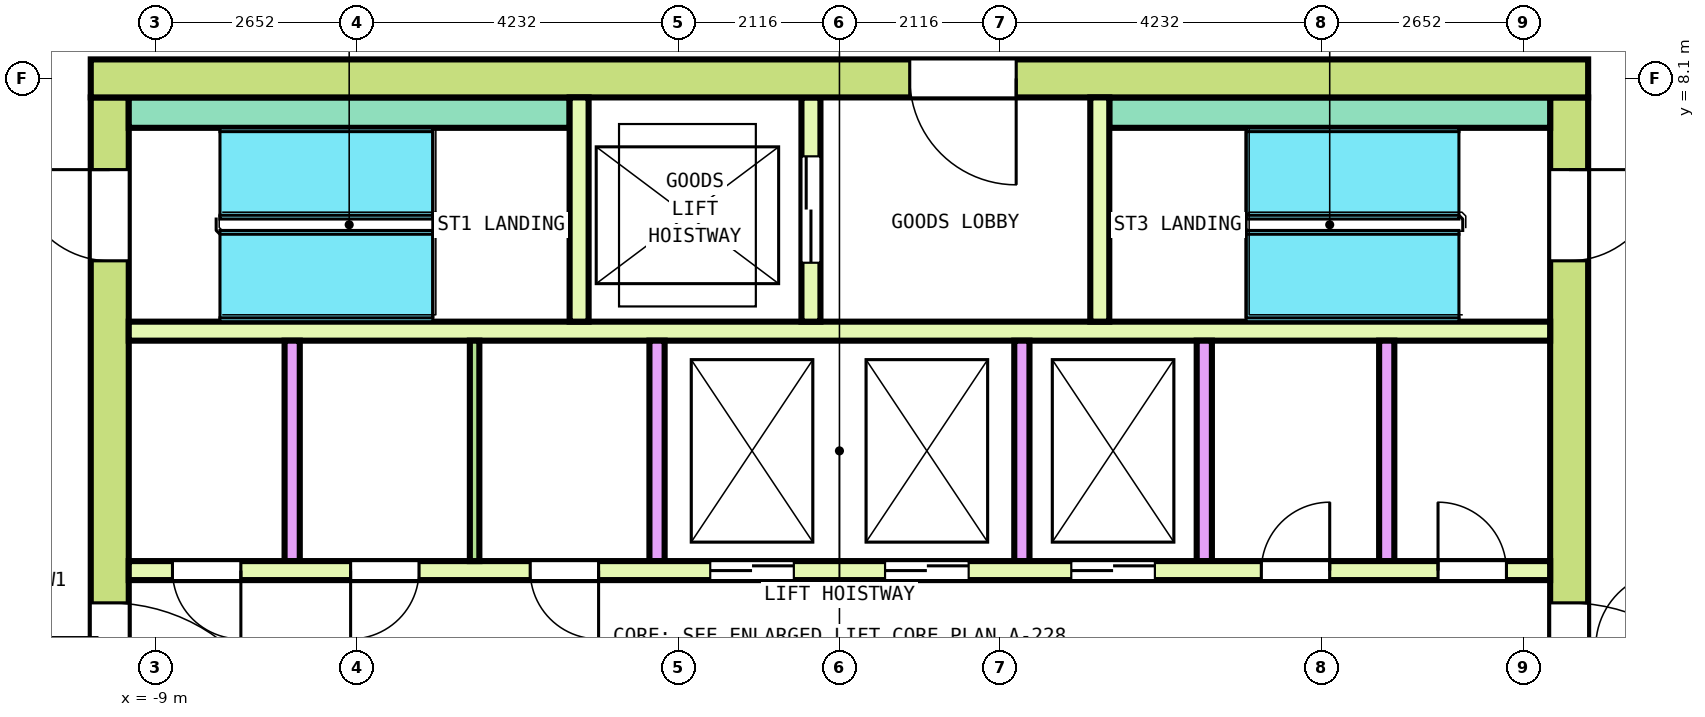
"""IFC4 building model, lengths in metres.
Left out: names, types, materials, properties, quantities, classifications, styles, units other than length and angle.
Written with IfcOpenShell. Run it as: python <this file> out.ifc"""

import sys

from ifc_helpers import new_model, si_unit, direction, frame, frame_2d, origin, place, context, subcontext, project, spatial, rectangle, extrude, element, fill, save


model = new_model("IFC4")
c1 = context("Model", 3, precision=1e-05, world=origin(), true_north=direction((0.0, 1.0)))
c2 = subcontext(c1, "Body", "Model", "MODEL_VIEW")
j1 = project(units=[si_unit("LENGTHUNIT", "METRE"), si_unit("PLANEANGLEUNIT", "RADIAN")], contexts=[c1])
p1 = place(None, origin())
s1 = spatial("IfcSite", under=j1, at=p1, CompositionType="ELEMENT")
p2 = place(p1, origin())
s2 = spatial("IfcBuilding", under=s1, at=p2, CompositionType="ELEMENT")
p3 = place(p2, frame((0.0, 0.0, 328.6)))
s3 = spatial("IfcBuildingStorey", under=s2, at=p3, CompositionType="ELEMENT", Elevation=328.6)
p4 = place(p3, frame((-9.85, 8.1, 0.0), z_axis=(0.0, 0.0, 1.0), x_axis=(1.0, 0.0, 0.0)))
e1 = element("IfcWall", 1, at=p4, inside=s3, PredefinedType="SHEAR", context=c2, shape_type="SweptSolid", body=[
    extrude(rectangle(XDim=19.7, YDim=0.5, at=frame_2d((9.85, 0.0))), origin(), (0.0, 0.0, 1.0), 3.7),
])
p5 = place(p4, frame((10.775, 0.0, 0.0)))
e2 = element("IfcOpeningElement", 2, at=p5, cuts=e1, PredefinedType="OPENING", context=c2, shape_type="SweptSolid", body=[
    extrude(rectangle(XDim=1.4, YDim=2.1, at=frame_2d((0.7, 1.05))), frame((0.0, 0.26, 0.0), z_axis=(0.0, -1.0, 0.0), x_axis=(1.0, 0.0, 0.0)), (0.0, 0.0, 1.0), 0.52),
])
p6 = place(p3, frame((-9.6, -7.85, 0.0), z_axis=(0.0, 0.0, 1.0), x_axis=(0.0, 1.0, 0.0)))
e3 = element("IfcWall", 3, at=p6, inside=s3, PredefinedType="SHEAR", context=c2, shape_type="SweptSolid", body=[
    extrude(rectangle(XDim=15.7, YDim=0.5, at=frame_2d((7.85, 0.0))), origin(), (0.0, 0.0, 1.0), 3.7),
])
p7 = place(p6, frame((6.65, 0.0, 0.0)))
e4 = element("IfcOpeningElement", 4, at=p7, cuts=e3, PredefinedType="OPENING", context=c2, shape_type="SweptSolid", body=[
    extrude(rectangle(XDim=2.4, YDim=2.1, at=frame_2d((1.2, 1.05))), frame((0.0, 0.26, 0.0), z_axis=(0.0, -1.0, 0.0), x_axis=(1.0, 0.0, 0.0)), (0.0, 0.0, 1.0), 0.52),
])
p8 = place(p6, frame((13.55, 0.0, 0.0)))
e5 = element("IfcOpeningElement", 5, at=p8, cuts=e3, PredefinedType="OPENING", context=c2, shape_type="SweptSolid", body=[
    extrude(rectangle(XDim=1.2, YDim=2.1, at=frame_2d((0.6, 1.05))), frame((0.0, 0.26, 0.0), z_axis=(0.0, -1.0, 0.0), x_axis=(1.0, 0.0, 0.0)), (0.0, 0.0, 1.0), 0.52),
])
p9 = place(p6, frame((0.95, 0.0, 0.0)))
e6 = element("IfcOpeningElement", 6, at=p9, cuts=e3, PredefinedType="OPENING", context=c2, shape_type="SweptSolid", body=[
    extrude(rectangle(XDim=1.2, YDim=2.1, at=frame_2d((0.6, 1.05))), frame((0.0, 0.26, 0.0), z_axis=(0.0, -1.0, 0.0), x_axis=(1.0, 0.0, 0.0)), (0.0, 0.0, 1.0), 0.52),
])
p10 = place(p3, frame((9.6, -7.85, 0.0), z_axis=(0.0, 0.0, 1.0), x_axis=(0.0, 1.0, 0.0)))
e7 = element("IfcWall", 7, at=p10, inside=s3, PredefinedType="SHEAR", context=c2, shape_type="SweptSolid", body=[
    extrude(rectangle(XDim=15.7, YDim=0.5, at=frame_2d((7.85, 0.0))), origin(), (0.0, 0.0, 1.0), 3.7),
])
p11 = place(p10, frame((6.65, 0.0, 0.0)))
e8 = element("IfcOpeningElement", 8, at=p11, cuts=e7, PredefinedType="OPENING", context=c2, shape_type="SweptSolid", body=[
    extrude(rectangle(XDim=2.4, YDim=2.1, at=frame_2d((1.2, 1.05))), frame((0.0, 0.26, 0.0), z_axis=(0.0, -1.0, 0.0), x_axis=(1.0, 0.0, 0.0)), (0.0, 0.0, 1.0), 0.52),
])
p12 = place(p10, frame((13.55, 0.0, 0.0)))
e9 = element("IfcOpeningElement", 9, at=p12, cuts=e7, PredefinedType="OPENING", context=c2, shape_type="SweptSolid", body=[
    extrude(rectangle(XDim=1.2, YDim=2.1, at=frame_2d((0.6, 1.05))), frame((0.0, 0.26, 0.0), z_axis=(0.0, -1.0, 0.0), x_axis=(1.0, 0.0, 0.0)), (0.0, 0.0, 1.0), 0.52),
])
p13 = place(p10, frame((1.05, 0.0, 0.0)))
e10 = element("IfcOpeningElement", 10, at=p13, cuts=e7, PredefinedType="OPENING", context=c2, shape_type="SweptSolid", body=[
    extrude(rectangle(XDim=1.0, YDim=2.1, at=frame_2d((0.5, 1.05))), frame((0.0, 0.26, 0.0), z_axis=(0.0, -1.0, 0.0), x_axis=(1.0, 0.0, 0.0)), (0.0, 0.0, 1.0), 0.52),
])
p14 = place(p3, frame((-9.35, 1.625, 0.0), z_axis=(0.0, 0.0, 1.0), x_axis=(1.0, 0.0, 0.0)))
e11 = element("IfcWall", 11, at=p14, inside=s3, PredefinedType="SOLIDWALL", context=c2, shape_type="SweptSolid", body=[
    extrude(rectangle(XDim=18.7, YDim=0.25, at=frame_2d((9.35, 0.0))), origin(), (0.0, 0.0, 1.0), 3.7),
])
p15 = place(p14, frame((7.65, 0.0, 0.0)))
e12 = element("IfcOpeningElement", 12, at=p15, cuts=e11, PredefinedType="OPENING", context=c2, shape_type="SweptSolid", body=[
    extrude(rectangle(XDim=1.1, YDim=2.1, at=frame_2d((0.55, 1.05))), frame((0.0, 0.135, 0.0), z_axis=(0.0, -1.0, 0.0), x_axis=(1.0, 0.0, 0.0)), (0.0, 0.0, 1.0), 0.27),
])
p16 = place(p14, frame((9.95, 0.0, 0.0)))
e13 = element("IfcOpeningElement", 13, at=p16, cuts=e11, PredefinedType="OPENING", context=c2, shape_type="SweptSolid", body=[
    extrude(rectangle(XDim=1.1, YDim=2.1, at=frame_2d((0.55, 1.05))), frame((0.0, 0.135, 0.0), z_axis=(0.0, -1.0, 0.0), x_axis=(1.0, 0.0, 0.0)), (0.0, 0.0, 1.0), 0.27),
])
p17 = place(p14, frame((12.4, 0.0, 0.0)))
e14 = element("IfcOpeningElement", 14, at=p17, cuts=e11, PredefinedType="OPENING", context=c2, shape_type="SweptSolid", body=[
    extrude(rectangle(XDim=1.1, YDim=2.1, at=frame_2d((0.55, 1.05))), frame((0.0, 0.135, 0.0), z_axis=(0.0, -1.0, 0.0), x_axis=(1.0, 0.0, 0.0)), (0.0, 0.0, 1.0), 0.27),
])
p18 = place(p14, frame((0.575, 0.0, 0.0)))
e15 = element("IfcOpeningElement", 15, at=p18, cuts=e11, PredefinedType="OPENING", context=c2, shape_type="SweptSolid", body=[
    extrude(rectangle(XDim=0.9, YDim=2.1, at=frame_2d((0.45, 1.05))), frame((0.0, 0.135, 0.0), z_axis=(0.0, -1.0, 0.0), x_axis=(1.0, 0.0, 0.0)), (0.0, 0.0, 1.0), 0.27),
])
p19 = place(p14, frame((2.919, 0.0, 0.0)))
e16 = element("IfcOpeningElement", 16, at=p19, cuts=e11, PredefinedType="OPENING", context=c2, shape_type="SweptSolid", body=[
    extrude(rectangle(XDim=0.9, YDim=2.1, at=frame_2d((0.45, 1.05))), frame((0.0, 0.135, 0.0), z_axis=(0.0, -1.0, 0.0), x_axis=(1.0, 0.0, 0.0)), (0.0, 0.0, 1.0), 0.27),
])
p20 = place(p14, frame((5.281, 0.0, 0.0)))
e17 = element("IfcOpeningElement", 17, at=p20, cuts=e11, PredefinedType="OPENING", context=c2, shape_type="SweptSolid", body=[
    extrude(rectangle(XDim=0.9, YDim=2.1, at=frame_2d((0.45, 1.05))), frame((0.0, 0.135, 0.0), z_axis=(0.0, -1.0, 0.0), x_axis=(1.0, 0.0, 0.0)), (0.0, 0.0, 1.0), 0.27),
])
p21 = place(p14, frame((14.9, 0.0, 0.0)))
e18 = element("IfcOpeningElement", 18, at=p21, cuts=e11, PredefinedType="OPENING", context=c2, shape_type="SweptSolid", body=[
    extrude(rectangle(XDim=0.9, YDim=2.1, at=frame_2d((0.45, 1.05))), frame((0.0, 0.135, 0.0), z_axis=(0.0, -1.0, 0.0), x_axis=(1.0, 0.0, 0.0)), (0.0, 0.0, 1.0), 0.27),
])
p22 = place(p14, frame((17.225, 0.0, 0.0)))
e19 = element("IfcOpeningElement", 19, at=p22, cuts=e11, PredefinedType="OPENING", context=c2, shape_type="SweptSolid", body=[
    extrude(rectangle(XDim=0.9, YDim=2.1, at=frame_2d((0.45, 1.05))), frame((0.0, 0.135, 0.0), z_axis=(0.0, -1.0, 0.0), x_axis=(1.0, 0.0, 0.0)), (0.0, 0.0, 1.0), 0.27),
])
p23 = place(p3, frame((-9.35, 4.775, 0.0), z_axis=(0.0, 0.0, 1.0), x_axis=(1.0, 0.0, 0.0)))
e20 = element("IfcWall", 20, at=p23, inside=s3, PredefinedType="SOLIDWALL", context=c2, shape_type="SweptSolid", body=[
    extrude(rectangle(XDim=18.7, YDim=0.25, at=frame_2d((9.35, 0.0))), origin(), (0.0, 0.0, 1.0), 3.7),
])
for number, where, z_axis, x_axis in (
    (21, (-7.2, 1.75, 0.0), (0.0, 0.0, 1.0), (0.0, 1.0, 0.0)),
    (22, (-2.4, 1.75, 0.0), (0.0, 0.0, 1.0), (0.0, 1.0, 0.0)),
    (23, (2.4, 1.75, 0.0), (0.0, 0.0, 1.0), (0.0, 1.0, 0.0)),
    (24, (4.8, 1.75, 0.0), (0.0, 0.0, 1.0), (0.0, 1.0, 0.0)),
    (25, (7.2, 1.75, 0.0), (0.0, 0.0, 1.0), (0.0, 1.0, 0.0)),
):
    element("IfcWall", number, at=place(p3, frame(where, z_axis=z_axis, x_axis=x_axis)), inside=s3, PredefinedType="SOLIDWALL", context=c2, shape_type="SweptSolid", body=[
        extrude(rectangle(XDim=2.9, YDim=0.2, at=frame_2d((1.45, 0.0))), origin(), (0.0, 0.0, 1.0), 3.7),
    ])
for number, where, z_axis, x_axis in (
    (26, (-9.35, 7.65, 0.0), (0.0, 0.0, 1.0), (1.0, 0.0, 0.0)),
    (27, (3.55, 7.65, 0.0), (0.0, 0.0, 1.0), (1.0, 0.0, 0.0)),
):
    element("IfcWall", number, at=place(p3, frame(where, z_axis=z_axis, x_axis=x_axis)), inside=s3, PredefinedType="SOLIDWALL", context=c2, shape_type="SweptSolid", body=[
        extrude(rectangle(XDim=5.8, YDim=0.4, at=frame_2d((2.9, 0.0))), origin(), (0.0, 0.0, 1.0), 3.7),
    ])
p24 = place(p3, frame((-3.425, 4.9, 0.0), z_axis=(0.0, 0.0, 1.0), x_axis=(0.0, 1.0, 0.0)))
e28 = element("IfcWall", 28, at=p24, inside=s3, PredefinedType="SOLIDWALL", context=c2, shape_type="SweptSolid", body=[
    extrude(rectangle(XDim=2.95, YDim=0.25, at=frame_2d((1.475, 0.0))), origin(), (0.0, 0.0, 1.0), 3.7),
])
p25 = place(p3, frame((-0.375, 4.9, 0.0), z_axis=(0.0, 0.0, 1.0), x_axis=(0.0, 1.0, 0.0)))
e29 = element("IfcWall", 29, at=p25, inside=s3, PredefinedType="SOLIDWALL", context=c2, shape_type="SweptSolid", body=[
    extrude(rectangle(XDim=2.95, YDim=0.25, at=frame_2d((1.475, 0.0))), origin(), (0.0, 0.0, 1.0), 3.7),
])
p26 = place(p25, frame((0.775, 0.0, 0.0)))
e30 = element("IfcOpeningElement", 30, at=p26, cuts=e29, PredefinedType="OPENING", context=c2, shape_type="SweptSolid", body=[
    extrude(rectangle(XDim=1.4, YDim=2.1, at=frame_2d((0.7, 1.05))), frame((0.0, 0.135, 0.0), z_axis=(0.0, -1.0, 0.0), x_axis=(1.0, 0.0, 0.0)), (0.0, 0.0, 1.0), 0.27),
])
p27 = place(p3, frame((3.425, 4.9, 0.0), z_axis=(0.0, 0.0, 1.0), x_axis=(0.0, 1.0, 0.0)))
e31 = element("IfcWall", 31, at=p27, inside=s3, PredefinedType="SOLIDWALL", context=c2, shape_type="SweptSolid", body=[
    extrude(rectangle(XDim=2.95, YDim=0.25, at=frame_2d((1.475, 0.0))), origin(), (0.0, 0.0, 1.0), 3.7),
])
p28 = place(p3, frame((-4.8, 1.75, 0.0), z_axis=(0.0, 0.0, 1.0), x_axis=(0.0, 1.0, 0.0)))
e32 = element("IfcWall", 32, at=p28, inside=s3, PredefinedType="PARTITIONING", context=c2, shape_type="SweptSolid", body=[
    extrude(rectangle(XDim=2.9, YDim=0.125, at=frame_2d((1.45, 0.0))), origin(), (0.0, 0.0, 1.0), 3.7),
])
p29 = place(p15, origin())
e33 = element("IfcDoor", 33, at=p29, inside=s3, OperationType="DOUBLE_DOOR_SLIDING", PredefinedType="DOOR", context=c2, shape_type="SweptSolid", body=[
    extrude(rectangle(XDim=1.1, YDim=2.1, at=frame_2d((0.55, 1.05))), frame((0.0, 0.075, 0.0), z_axis=(0.0, -1.0, 0.0), x_axis=(1.0, 0.0, 0.0)), (0.0, 0.0, 1.0), 0.15),
])
fill(e12, e33)
p30 = place(p16, origin())
e34 = element("IfcDoor", 34, at=p30, inside=s3, OperationType="DOUBLE_DOOR_SLIDING", PredefinedType="DOOR", context=c2, shape_type="SweptSolid", body=[
    extrude(rectangle(XDim=1.1, YDim=2.1, at=frame_2d((0.55, 1.05))), frame((0.0, 0.075, 0.0), z_axis=(0.0, -1.0, 0.0), x_axis=(1.0, 0.0, 0.0)), (0.0, 0.0, 1.0), 0.15),
])
fill(e13, e34)
p31 = place(p17, origin())
e35 = element("IfcDoor", 35, at=p31, inside=s3, OperationType="DOUBLE_DOOR_SLIDING", PredefinedType="DOOR", context=c2, shape_type="SweptSolid", body=[
    extrude(rectangle(XDim=1.1, YDim=2.1, at=frame_2d((0.55, 1.05))), frame((0.0, 0.075, 0.0), z_axis=(0.0, -1.0, 0.0), x_axis=(1.0, 0.0, 0.0)), (0.0, 0.0, 1.0), 0.15),
])
fill(e14, e35)
p32 = place(p26, origin())
e36 = element("IfcDoor", 36, at=p32, inside=s3, OperationType="DOUBLE_DOOR_SLIDING", PredefinedType="DOOR", context=c2, shape_type="SweptSolid", body=[
    extrude(rectangle(XDim=1.4, YDim=2.1, at=frame_2d((0.7, 1.05))), frame((0.0, 0.075, 0.0), z_axis=(0.0, -1.0, 0.0), x_axis=(1.0, 0.0, 0.0)), (0.0, 0.0, 1.0), 0.15),
])
fill(e30, e36)
p33 = place(p7, origin())
e37 = element("IfcDoor", 37, at=p33, inside=s3, OperationType="DOUBLE_DOOR_SINGLE_SWING", PredefinedType="DOOR", context=c2, shape_type="SweptSolid", body=[
    extrude(rectangle(XDim=2.4, YDim=2.1, at=frame_2d((1.2, 1.05))), frame((0.0, 0.2, 0.0), z_axis=(0.0, -1.0, 0.0), x_axis=(1.0, 0.0, 0.0)), (0.0, 0.0, 1.0), 0.4),
])
fill(e4, e37)
p34 = place(p11, origin())
e38 = element("IfcDoor", 38, at=p34, inside=s3, OperationType="DOUBLE_DOOR_SINGLE_SWING", PredefinedType="DOOR", context=c2, shape_type="SweptSolid", body=[
    extrude(rectangle(XDim=2.4, YDim=2.1, at=frame_2d((1.2, 1.05))), frame((0.0, 0.2, 0.0), z_axis=(0.0, -1.0, 0.0), x_axis=(1.0, 0.0, 0.0)), (0.0, 0.0, 1.0), 0.4),
])
fill(e8, e38)
p35 = place(p8, origin())
e39 = element("IfcDoor", 39, at=p35, inside=s3, OperationType="SINGLE_SWING_RIGHT", PredefinedType="DOOR", context=c2, shape_type="SweptSolid", body=[
    extrude(rectangle(XDim=1.2, YDim=2.1, at=frame_2d((0.6, 1.05))), frame((0.0, 0.2, 0.0), z_axis=(0.0, -1.0, 0.0), x_axis=(1.0, 0.0, 0.0)), (0.0, 0.0, 1.0), 0.4),
])
fill(e5, e39)
p36 = place(p12, origin())
e40 = element("IfcDoor", 40, at=p36, inside=s3, OperationType="SINGLE_SWING_RIGHT", PredefinedType="DOOR", context=c2, shape_type="SweptSolid", body=[
    extrude(rectangle(XDim=1.2, YDim=2.1, at=frame_2d((0.6, 1.05))), frame((0.0, 0.2, 0.0), z_axis=(0.0, -1.0, 0.0), x_axis=(1.0, 0.0, 0.0)), (0.0, 0.0, 1.0), 0.4),
])
fill(e9, e40)
p37 = place(p5, origin())
e41 = element("IfcDoor", 41, at=p37, inside=s3, OperationType="DOUBLE_DOOR_SINGLE_SWING", PredefinedType="DOOR", context=c2, shape_type="SweptSolid", body=[
    extrude(rectangle(XDim=1.4, YDim=2.1, at=frame_2d((0.7, 1.05))), frame((0.0, 0.2, 0.0), z_axis=(0.0, -1.0, 0.0), x_axis=(1.0, 0.0, 0.0)), (0.0, 0.0, 1.0), 0.4),
])
fill(e2, e41)
p38 = place(p18, origin())
e42 = element("IfcDoor", 42, at=p38, inside=s3, OperationType="SINGLE_SWING_RIGHT", PredefinedType="DOOR", context=c2, shape_type="SweptSolid", body=[
    extrude(rectangle(XDim=0.9, YDim=2.1, at=frame_2d((0.45, 1.05))), frame((0.0, 0.075, 0.0), z_axis=(0.0, -1.0, 0.0), x_axis=(1.0, 0.0, 0.0)), (0.0, 0.0, 1.0), 0.15),
])
fill(e15, e42)
p39 = place(p19, origin())
e43 = element("IfcDoor", 43, at=p39, inside=s3, OperationType="SINGLE_SWING_LEFT", PredefinedType="DOOR", context=c2, shape_type="SweptSolid", body=[
    extrude(rectangle(XDim=0.9, YDim=2.1, at=frame_2d((0.45, 1.05))), frame((0.0, 0.075, 0.0), z_axis=(0.0, -1.0, 0.0), x_axis=(1.0, 0.0, 0.0)), (0.0, 0.0, 1.0), 0.15),
])
fill(e16, e43)
p40 = place(p20, origin())
e44 = element("IfcDoor", 44, at=p40, inside=s3, OperationType="SINGLE_SWING_RIGHT", PredefinedType="DOOR", context=c2, shape_type="SweptSolid", body=[
    extrude(rectangle(XDim=0.9, YDim=2.1, at=frame_2d((0.45, 1.05))), frame((0.0, 0.075, 0.0), z_axis=(0.0, -1.0, 0.0), x_axis=(1.0, 0.0, 0.0)), (0.0, 0.0, 1.0), 0.15),
])
fill(e17, e44)
p41 = place(p21, origin())
e45 = element("IfcDoor", 45, at=p41, inside=s3, OperationType="SINGLE_SWING_LEFT", PredefinedType="DOOR", context=c2, shape_type="SweptSolid", body=[
    extrude(rectangle(XDim=0.9, YDim=2.1, at=frame_2d((0.45, 1.05))), frame((0.0, 0.075, 0.0), z_axis=(0.0, -1.0, 0.0), x_axis=(1.0, 0.0, 0.0)), (0.0, 0.0, 1.0), 0.15),
])
fill(e18, e45)
p42 = place(p22, origin())
e46 = element("IfcDoor", 46, at=p42, inside=s3, OperationType="SINGLE_SWING_RIGHT", PredefinedType="DOOR", context=c2, shape_type="SweptSolid", body=[
    extrude(rectangle(XDim=0.9, YDim=2.1, at=frame_2d((0.45, 1.05))), frame((0.0, 0.075, 0.0), z_axis=(0.0, -1.0, 0.0), x_axis=(1.0, 0.0, 0.0)), (0.0, 0.0, 1.0), 0.15),
])
fill(e19, e46)
save(model, sys.argv[1])
